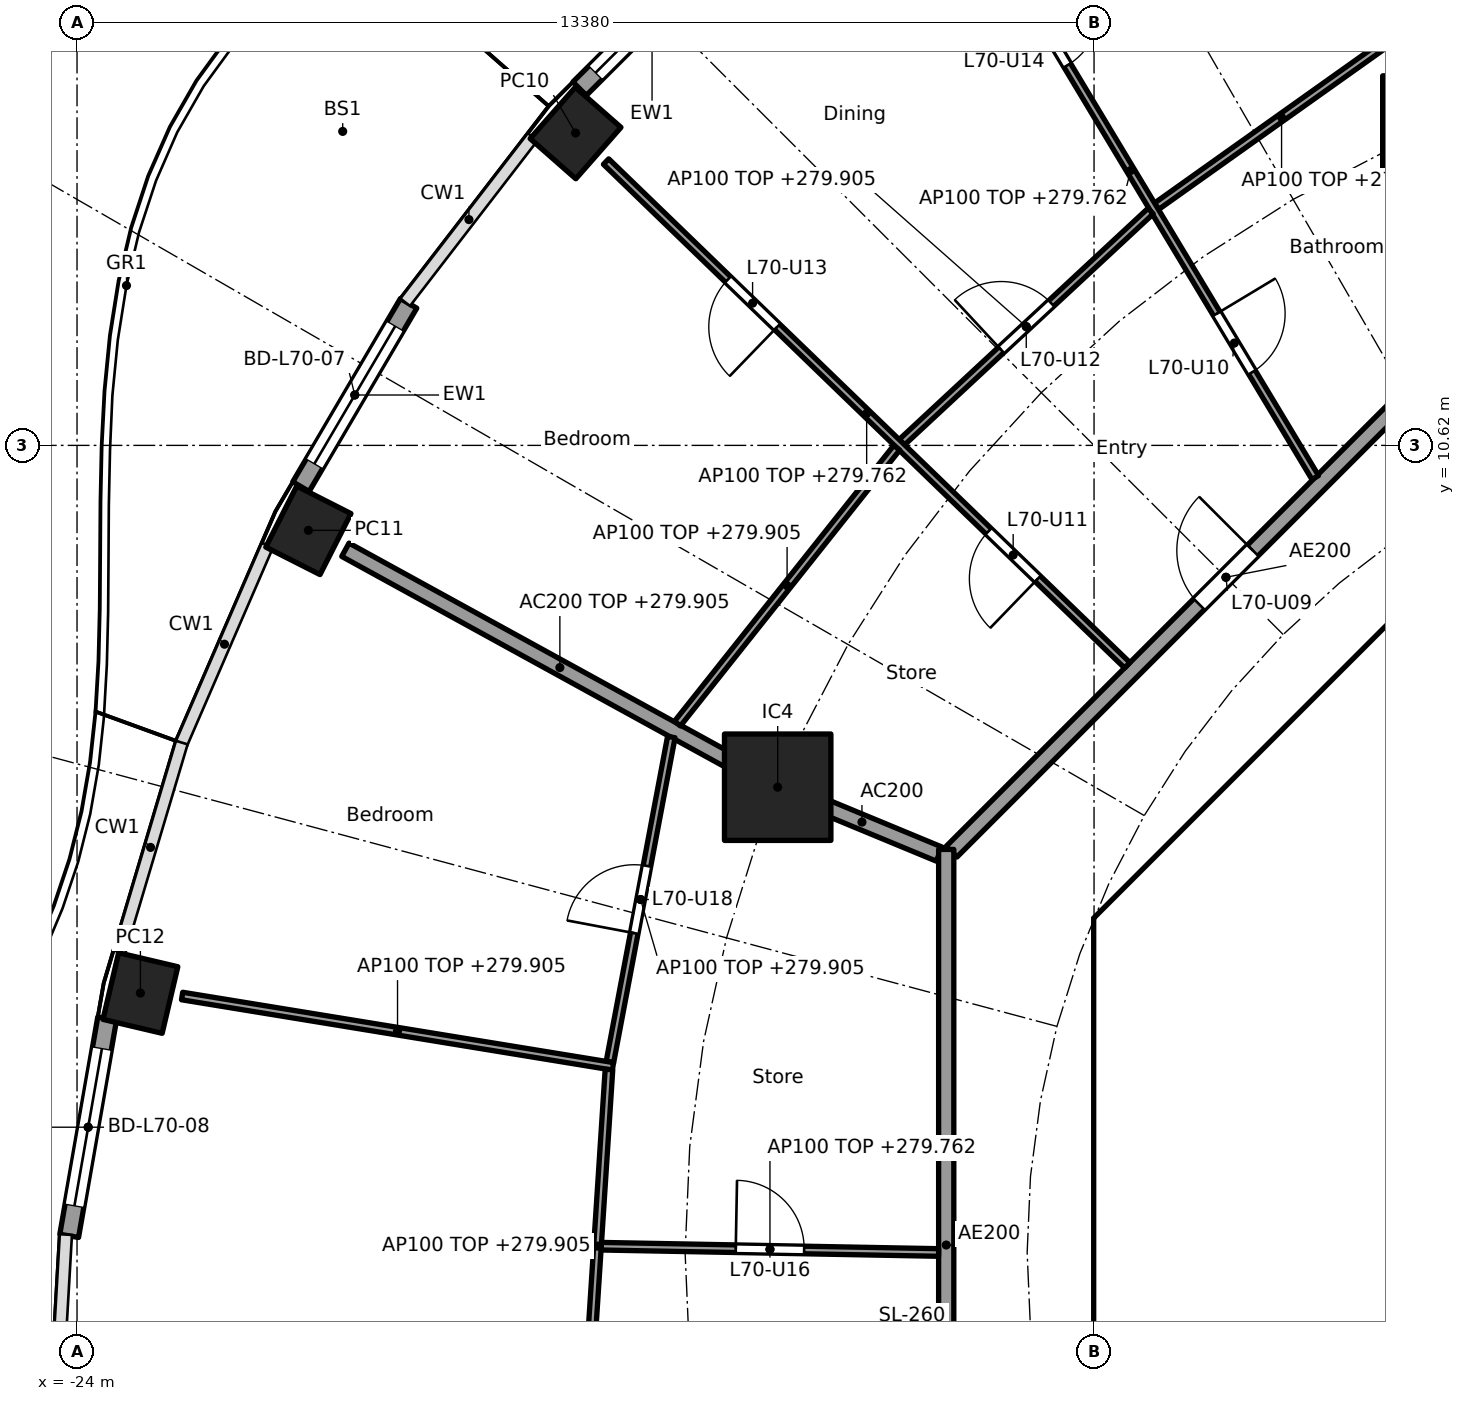
"""IFC4 building model, lengths in metres.
Left out: names, types, materials, properties, quantities, classifications, styles, units other than length and angle.
Written with IfcOpenShell. Run it as: python <this file> out.ifc"""

import sys

from ifc_helpers import new_model, si_unit, direction, frame, frame_2d, origin, origin_2d, place, context, subcontext, project, spatial, polyline, rectangle, hollow_rectangle, outline, extrude, element, fill, save


model = new_model("IFC4")
c1 = context("Model", 3, precision=1e-05, world=origin(), true_north=direction((0.0, 1.0)))
c2 = subcontext(c1, "Body", "Model", "MODEL_VIEW")
j1 = project(units=[si_unit("LENGTHUNIT", "METRE"), si_unit("PLANEANGLEUNIT", "RADIAN")], contexts=[c1])
p1 = place(None, origin())
s1 = spatial("IfcSite", under=j1, at=p1, CompositionType="ELEMENT")
p2 = place(p1, origin())
s2 = spatial("IfcBuilding", under=s1, at=p2, CompositionType="ELEMENT")
p3 = place(p2, frame((0.0, 0.0, 277.0)))
s3 = spatial("IfcBuildingStorey", under=s2, at=p3, CompositionType="ELEMENT", Elevation=277.0)
for number, where, z_axis, x_axis in (
    (1, (-17.441, 14.73, 0.0), (0.0, 0.0, 1.0), (-0.66, -0.751, 0.0)),
    (2, (-20.957, 9.502, 0.0), (0.0, 0.0, 1.0), (-0.452, -0.892, 0.0)),
    (3, (-23.166, 3.415, 0.0), (0.0, 0.0, 1.0), (-0.229, -0.973, 0.0)),
):
    element("IfcColumn", number, at=place(p3, frame(where, z_axis=z_axis, x_axis=x_axis)), inside=s3, PredefinedType="COLUMN", context=c2, shape_type="SweptSolid", body=[
        extrude(hollow_rectangle(XDim=0.9, YDim=0.8, WallThickness=0.028, at=origin_2d()), origin(), (0.0, 0.0, 1.0), 3.7),
    ])
for number, where, z_axis, x_axis in (
    (4, (-6.123, 14.782, 0.0), (0.0, 0.0, 1.0), (1.0, 0.0, 0.0)),
    (5, (-14.782, 6.123, 0.0), (0.0, 0.0, 1.0), (1.0, 0.0, 0.0)),
):
    element("IfcColumn", number, at=place(p3, frame(where, z_axis=z_axis, x_axis=x_axis)), inside=s3, PredefinedType="COLUMN", context=c2, shape_type="SweptSolid", body=[
        extrude(rectangle(XDim=1.4, YDim=1.4, at=origin_2d()), origin(), (0.0, 0.0, 1.0), 3.7),
    ])
p4 = place(p3, frame((-17.388, 15.313, 0.0), z_axis=(0.0, 0.0, 1.0), x_axis=(0.707831739508, 0.706381078841, 0.0)))
e6 = element("IfcWall", 6, at=p4, inside=s3, PredefinedType="SOLIDWALL", context=c2, shape_type="SweptSolid", body=[
    extrude(rectangle(XDim=2.693, YDim=0.25, at=frame_2d((1.346, 0.0))), origin(), (0.0, 0.0, 1.0), 3.44),
])
p5 = place(p4, frame((0.296, 0.0, 0.0)))
e7 = element("IfcOpeningElement", 7, at=p5, cuts=e6, PredefinedType="OPENING", context=c2, shape_type="SweptSolid", body=[
    extrude(rectangle(XDim=2.1, YDim=2.4, at=frame_2d((1.05, 1.2))), frame((0.0, 0.135, 0.0), z_axis=(0.0, -1.0, 0.0), x_axis=(1.0, 0.0, 0.0)), (0.0, 0.0, 1.0), 0.27),
])
p6 = place(p3, frame((-21.054, 10.077, 0.0), z_axis=(0.0, 0.0, 1.0), x_axis=(0.506371364425, 0.862315511452, 0.0)))
e8 = element("IfcWall", 8, at=p6, inside=s3, PredefinedType="SOLIDWALL", context=c2, shape_type="SweptSolid", body=[
    extrude(rectangle(XDim=2.796, YDim=0.25, at=frame_2d((1.398, 0.0))), origin(), (0.0, 0.0, 1.0), 3.44),
])
p7 = place(p6, frame((0.348, 0.0, 0.0)))
e9 = element("IfcOpeningElement", 9, at=p7, cuts=e8, PredefinedType="OPENING", context=c2, shape_type="SweptSolid", body=[
    extrude(rectangle(XDim=2.1, YDim=2.4, at=frame_2d((1.05, 1.2))), frame((0.0, 0.135, 0.0), z_axis=(0.0, -1.0, 0.0), x_axis=(1.0, 0.0, 0.0)), (0.0, 0.0, 1.0), 0.27),
])
p8 = place(p3, frame((-24.103, 0.22, 0.0), z_axis=(0.0, 0.0, 1.0), x_axis=(0.172182411767, 0.985065082661, 0.0)))
e10 = element("IfcWall", 10, at=p8, inside=s3, PredefinedType="SOLIDWALL", context=c2, shape_type="SweptSolid", body=[
    extrude(rectangle(XDim=2.903, YDim=0.25, at=frame_2d((1.451, 0.0))), origin(), (0.0, 0.0, 1.0), 3.44),
])
p9 = place(p8, frame((0.401, 0.0, 0.0)))
e11 = element("IfcOpeningElement", 11, at=p9, cuts=e10, PredefinedType="OPENING", context=c2, shape_type="SweptSolid", body=[
    extrude(rectangle(XDim=2.1, YDim=2.4, at=frame_2d((1.05, 1.2))), frame((0.0, 0.135, 0.0), z_axis=(0.0, -1.0, 0.0), x_axis=(1.0, 0.0, 0.0)), (0.0, 0.0, 1.0), 0.27),
])
p10 = place(p3, frame((-4.613, 9.988, 0.0), z_axis=(0.0, 0.0, 1.0), x_axis=(-0.707106781187, -0.707106781187, 0.0)))
e12 = element("IfcWall", 12, at=p10, inside=s3, PredefinedType="SHEAR", context=c2, shape_type="SweptSolid", body=[
    extrude(rectangle(XDim=7.602, YDim=0.6, at=frame_2d((3.801, 0.0))), origin(), (0.0, 0.0, 1.0), 3.44),
])
p11 = place(p10, frame((0.351, 0.0, 0.0)))
e13 = element("IfcOpeningElement", 13, at=p11, cuts=e12, PredefinedType="OPENING", context=c2, shape_type="SweptSolid", body=[
    extrude(rectangle(XDim=1.1, YDim=2.1, at=frame_2d((0.55, 1.05))), frame((0.0, 0.31, 0.0), z_axis=(0.0, -1.0, 0.0), x_axis=(1.0, 0.0, 0.0)), (0.0, 0.0, 1.0), 0.62),
])
p12 = place(p3, frame((-10.325, 3.801, 0.0), z_axis=(0.0, 0.0, 1.0), x_axis=(0.0, -1.0, 0.0)))
e14 = element("IfcWall", 14, at=p12, inside=s3, PredefinedType="SHEAR", context=c2, shape_type="SweptSolid", body=[
    extrude(rectangle(XDim=7.602, YDim=0.6, at=frame_2d((3.801, 0.0))), origin(), (0.0, 0.0, 1.0), 3.44),
])
p13 = place(p12, frame((0.651, 0.0, 0.0)))
e15 = element("IfcOpeningElement", 15, at=p13, cuts=e14, PredefinedType="OPENING", context=c2, shape_type="SweptSolid", body=[
    extrude(rectangle(XDim=1.5, YDim=2.1, at=frame_2d((0.75, 1.05))), frame((0.0, 0.31, 0.0), z_axis=(0.0, -1.0, 0.0), x_axis=(1.0, 0.0, 0.0)), (0.0, 0.0, 1.0), 0.62),
])
p14 = place(p12, frame((5.451, 0.0, 0.0)))
e16 = element("IfcOpeningElement", 16, at=p14, cuts=e14, PredefinedType="OPENING", context=c2, shape_type="SweptSolid", body=[
    extrude(rectangle(XDim=1.5, YDim=2.1, at=frame_2d((0.75, 1.05))), frame((0.0, 0.31, 0.0), z_axis=(0.0, -1.0, 0.0), x_axis=(1.0, 0.0, 0.0)), (0.0, 0.0, 1.0), 0.62),
])
p15 = place(p3, origin())
e17 = element("IfcWall", 17, at=p15, inside=s3, PredefinedType="SHEAR", context=c2, shape_type="SweptSolid", body=[
    extrude(outline(polyline([(-10.2, 4.825), (-9.776, 4.401), (-10.025, 4.152), (-10.025, 3.801), (-10.625, 3.801), (-10.625, 4.401), (-10.2, 4.825)])), origin(), (0.0, 0.0, 1.0), 3.44),
])
p16 = place(p3, frame((-10.025, 4.0, 0.0), z_axis=(0.0, 0.0, 1.0), x_axis=(1.0, 0.0, 0.0)))
e18 = element("IfcWall", 18, at=p16, inside=s3, PredefinedType="PARTITIONING", context=c2, shape_type="SweptSolid", body=[
    extrude(rectangle(XDim=3.325, YDim=0.2, at=frame_2d((1.662, 0.0))), origin(), (0.0, 0.0, 1.0), 3.44),
])
p17 = place(p3, frame((-8.301, 5.8, 0.0), z_axis=(0.0, 0.0, 1.0), x_axis=(1.0, 0.0, 0.0)))
e19 = element("IfcWall", 19, at=p17, inside=s3, PredefinedType="PARTITIONING", context=c2, shape_type="SweptSolid", body=[
    extrude(rectangle(XDim=2.426, YDim=0.15, at=frame_2d((1.213, 0.0))), origin(), (0.0, 0.0, 1.0), 3.44),
])
p18 = place(p3, frame((-6.134, 14.831, 0.0), z_axis=(0.0, 0.0, 1.0), x_axis=(-0.214842475666, 0.976648714047, 0.0)))
e20 = element("IfcWall", 20, at=p18, inside=s3, PredefinedType="PARTITIONING", context=c2, shape_type="SweptSolid", body=[
    extrude(rectangle(XDim=6.031, YDim=0.2, at=frame_2d((3.015, 0.0))), origin(), (0.0, 0.0, 1.0), 2.905),
])
p19 = place(p3, frame((-12.657, 5.243, 0.0), z_axis=(0.0, 0.0, 1.0), x_axis=(-0.923869415315, 0.382707856524, 0.0)))
e21 = element("IfcWall", 21, at=p19, inside=s3, PredefinedType="PARTITIONING", context=c2, shape_type="SweptSolid", body=[
    extrude(rectangle(XDim=2.2, YDim=0.2, at=frame_2d((1.1, 0.0))), origin(), (0.0, 0.0, 1.0), 3.44),
])
p20 = place(p3, frame((-14.826, 6.147, 0.0), z_axis=(0.0, 0.0, 1.0), x_axis=(-0.876484755865, 0.481429613481, 0.0)))
e22 = element("IfcWall", 22, at=p20, inside=s3, PredefinedType="PARTITIONING", context=c2, shape_type="SweptSolid", body=[
    extrude(rectangle(XDim=6.439, YDim=0.2, at=frame_2d((3.219, 0.0))), origin(), (0.0, 0.0, 1.0), 2.905),
])
p21 = place(p3, frame((-5.275, 12.494, 0.0), z_axis=(0.0, 0.0, 1.0), x_axis=(-0.707106781187, -0.707106781187, 0.0)))
e23 = element("IfcWall", 23, at=p21, inside=s3, PredefinedType="PARTITIONING", context=c2, shape_type="SweptSolid", body=[
    extrude(rectangle(XDim=10.209, YDim=0.2, at=frame_2d((5.104, 0.0))), origin(), (0.0, 0.0, 1.0), 3.44),
])
p22 = place(p21, frame((4.604, 0.0, 0.0)))
e24 = element("IfcOpeningElement", 24, at=p22, cuts=e23, PredefinedType="OPENING", context=c2, shape_type="SweptSolid", body=[
    extrude(rectangle(XDim=1.0, YDim=2.1, at=frame_2d((0.5, 1.05))), frame((0.0, 0.11, 0.0), z_axis=(0.0, -1.0, 0.0), x_axis=(1.0, 0.0, 0.0)), (0.0, 0.0, 1.0), 0.22),
])
p23 = place(p3, frame((-12.565, 5.304, 0.0), z_axis=(0.0, 0.0, 1.0), x_axis=(0.0, -1.0, 0.0)))
e25 = element("IfcWall", 25, at=p23, inside=s3, PredefinedType="PARTITIONING", context=c2, shape_type="SweptSolid", body=[
    extrude(rectangle(XDim=10.409, YDim=0.2, at=frame_2d((5.205, 0.0))), origin(), (0.0, 0.0, 1.0), 3.44),
])
p24 = place(p23, frame((6.539, 0.0, 0.0)))
e26 = element("IfcOpeningElement", 26, at=p24, cuts=e25, PredefinedType="OPENING", context=c2, shape_type="SweptSolid", body=[
    extrude(rectangle(XDim=1.0, YDim=2.1, at=frame_2d((0.5, 1.05))), frame((0.0, 0.11, 0.0), z_axis=(0.0, -1.0, 0.0), x_axis=(1.0, 0.0, 0.0)), (0.0, 0.0, 1.0), 0.22),
])
p25 = place(p3, frame((-6.508, 16.103, 0.0), z_axis=(0.0, 0.0, 1.0), x_axis=(-0.815202203556, -0.579176456114, 0.0)))
e27 = element("IfcWall", 27, at=p25, inside=s3, PredefinedType="PARTITIONING", context=c2, shape_type="SweptSolid", body=[
    extrude(rectangle(XDim=4.036, YDim=0.1, at=frame_2d((2.018, 0.0))), origin(), (0.0, 0.0, 1.0), 2.905),
])
p26 = place(p3, frame((-7.709, 10.197, 0.0), z_axis=(0.0, 0.0, 1.0), x_axis=(-0.515516160663, 0.856879856278, 0.0)))
e28 = element("IfcWall", 28, at=p26, inside=s3, PredefinedType="PARTITIONING", context=c2, shape_type="SweptSolid", body=[
    extrude(rectangle(XDim=9.426, YDim=0.1, at=frame_2d((4.713, 0.0))), origin(), (0.0, 0.0, 1.0), 2.762),
])
p27 = place(p26, frame((1.615, 0.0, 0.0)))
e29 = element("IfcOpeningElement", 29, at=p27, cuts=e28, PredefinedType="OPENING", context=c2, shape_type="SweptSolid", body=[
    extrude(rectangle(XDim=0.9, YDim=2.1, at=frame_2d((0.45, 1.05))), frame((0.0, 0.06, 0.0), z_axis=(0.0, -1.0, 0.0), x_axis=(1.0, 0.0, 0.0)), (0.0, 0.0, 1.0), 0.12),
])
p28 = place(p26, frame((6.328, 0.0, 0.0)))
e30 = element("IfcOpeningElement", 30, at=p28, cuts=e28, PredefinedType="OPENING", context=c2, shape_type="SweptSolid", body=[
    extrude(rectangle(XDim=0.9, YDim=2.1, at=frame_2d((0.45, 1.05))), frame((0.0, 0.06, 0.0), z_axis=(0.0, -1.0, 0.0), x_axis=(1.0, 0.0, 0.0)), (0.0, 0.0, 1.0), 0.12),
])
p29 = place(p3, frame((-9.875, 13.702, 0.0), z_axis=(0.0, 0.0, 1.0), x_axis=(-0.732618266441, -0.680639754699, 0.0)))
e31 = element("IfcWall", 31, at=p29, inside=s3, PredefinedType="PARTITIONING", context=c2, shape_type="SweptSolid", body=[
    extrude(rectangle(XDim=4.467, YDim=0.1, at=frame_2d((2.233, 0.0))), origin(), (0.0, 0.0, 1.0), 2.905),
])
p30 = place(p29, frame((1.783, 0.0, 0.0)))
e32 = element("IfcOpeningElement", 32, at=p30, cuts=e31, PredefinedType="OPENING", context=c2, shape_type="SweptSolid", body=[
    extrude(rectangle(XDim=0.9, YDim=2.1, at=frame_2d((0.45, 1.05))), frame((0.0, 0.06, 0.0), z_axis=(0.0, -1.0, 0.0), x_axis=(1.0, 0.0, 0.0)), (0.0, 0.0, 1.0), 0.12),
])
p31 = place(p3, frame((-10.183, 7.727, 0.0), z_axis=(0.0, 0.0, 1.0), x_axis=(-0.719063433856, 0.694944442449, 0.0)))
e33 = element("IfcWall", 33, at=p31, inside=s3, PredefinedType="PARTITIONING", context=c2, shape_type="SweptSolid", body=[
    extrude(rectangle(XDim=9.535, YDim=0.1, at=frame_2d((4.768, 0.0))), origin(), (0.0, 0.0, 1.0), 2.762),
])
p32 = place(p31, frame((1.637, 0.0, 0.0)))
e34 = element("IfcOpeningElement", 34, at=p32, cuts=e33, PredefinedType="OPENING", context=c2, shape_type="SweptSolid", body=[
    extrude(rectangle(XDim=0.9, YDim=2.1, at=frame_2d((0.45, 1.05))), frame((0.0, 0.06, 0.0), z_axis=(0.0, -1.0, 0.0), x_axis=(1.0, 0.0, 0.0)), (0.0, 0.0, 1.0), 0.12),
])
p33 = place(p31, frame((6.405, 0.0, 0.0)))
e35 = element("IfcOpeningElement", 35, at=p33, cuts=e33, PredefinedType="OPENING", context=c2, shape_type="SweptSolid", body=[
    extrude(rectangle(XDim=0.9, YDim=2.1, at=frame_2d((0.45, 1.05))), frame((0.0, 0.06, 0.0), z_axis=(0.0, -1.0, 0.0), x_axis=(1.0, 0.0, 0.0)), (0.0, 0.0, 1.0), 0.12),
])
p34 = place(p3, frame((-13.216, 10.589, 0.0), z_axis=(0.0, 0.0, 1.0), x_axis=(-0.622251572882, -0.782817335045, 0.0)))
e36 = element("IfcWall", 36, at=p34, inside=s3, PredefinedType="PARTITIONING", context=c2, shape_type="SweptSolid", body=[
    extrude(rectangle(XDim=4.636, YDim=0.1, at=frame_2d((2.318, 0.0))), origin(), (0.0, 0.0, 1.0), 2.905),
])
p35 = place(p3, frame((-16.181, 6.783, 0.0), z_axis=(0.0, 0.0, 1.0), x_axis=(-0.185670583745, -0.982612046706, 0.0)))
e37 = element("IfcWall", 37, at=p35, inside=s3, PredefinedType="PARTITIONING", context=c2, shape_type="SweptSolid", body=[
    extrude(rectangle(XDim=4.351, YDim=0.1, at=frame_2d((2.176, 0.0))), origin(), (0.0, 0.0, 1.0), 2.905),
])
p36 = place(p35, frame((1.726, 0.0, 0.0)))
e38 = element("IfcOpeningElement", 38, at=p36, cuts=e37, PredefinedType="OPENING", context=c2, shape_type="SweptSolid", body=[
    extrude(rectangle(XDim=0.9, YDim=2.1, at=frame_2d((0.45, 1.05))), frame((0.0, 0.06, 0.0), z_axis=(0.0, -1.0, 0.0), x_axis=(1.0, 0.0, 0.0)), (0.0, 0.0, 1.0), 0.12),
])
p37 = place(p3, frame((-16.949, 2.451, 0.0), z_axis=(0.0, 0.0, 1.0), x_axis=(-0.986937570833, 0.161103169673, 0.0)))
e39 = element("IfcWall", 39, at=p37, inside=s3, PredefinedType="PARTITIONING", context=c2, shape_type="SweptSolid", body=[
    extrude(rectangle(XDim=5.743, YDim=0.1, at=frame_2d((2.872, 0.0))), origin(), (0.0, 0.0, 1.0), 2.905),
])
p38 = place(p3, frame((-17.002, 2.409, 0.0), z_axis=(0.0, 0.0, 1.0), x_axis=(-0.064855550758, -0.997894662545, 0.0)))
e40 = element("IfcWall", 40, at=p38, inside=s3, PredefinedType="PARTITIONING", context=c2, shape_type="SweptSolid", body=[
    extrude(rectangle(XDim=4.656, YDim=0.1, at=frame_2d((2.328, 0.0))), origin(), (0.0, 0.0, 1.0), 2.905),
])
p39 = place(p3, frame((-12.665, 0.002, 0.0), z_axis=(0.0, 0.0, 1.0), x_axis=(-0.999827178165, 0.018590691287, 0.0)))
e41 = element("IfcWall", 41, at=p39, inside=s3, PredefinedType="PARTITIONING", context=c2, shape_type="SweptSolid", body=[
    extrude(rectangle(XDim=4.439, YDim=0.1, at=frame_2d((2.219, 0.0))), origin(), (0.0, 0.0, 1.0), 2.762),
])
p40 = place(p39, frame((1.769, 0.0, 0.0)))
e42 = element("IfcOpeningElement", 42, at=p40, cuts=e41, PredefinedType="OPENING", context=c2, shape_type="SweptSolid", body=[
    extrude(rectangle(XDim=0.9, YDim=2.1, at=frame_2d((0.45, 1.05))), frame((0.0, 0.06, 0.0), z_axis=(0.0, -1.0, 0.0), x_axis=(1.0, 0.0, 0.0)), (0.0, 0.0, 1.0), 0.12),
])
p41 = place(p5, origin())
e43 = element("IfcDoor", 43, at=p41, inside=s3, OperationType="SLIDING_TO_LEFT", PredefinedType="DOOR", context=c2, shape_type="SweptSolid", body=[
    extrude(rectangle(XDim=2.1, YDim=2.4, at=frame_2d((1.05, 1.2))), frame((0.0, 0.025, 0.0), z_axis=(0.0, -1.0, 0.0), x_axis=(1.0, 0.0, 0.0)), (0.0, 0.0, 1.0), 0.05),
])
fill(e7, e43)
p42 = place(p7, origin())
e44 = element("IfcDoor", 44, at=p42, inside=s3, OperationType="SLIDING_TO_LEFT", PredefinedType="DOOR", context=c2, shape_type="SweptSolid", body=[
    extrude(rectangle(XDim=2.1, YDim=2.4, at=frame_2d((1.05, 1.2))), frame((0.0, 0.025, 0.0), z_axis=(0.0, -1.0, 0.0), x_axis=(1.0, 0.0, 0.0)), (0.0, 0.0, 1.0), 0.05),
])
fill(e9, e44)
p43 = place(p9, origin())
e45 = element("IfcDoor", 45, at=p43, inside=s3, OperationType="SLIDING_TO_LEFT", PredefinedType="DOOR", context=c2, shape_type="SweptSolid", body=[
    extrude(rectangle(XDim=2.1, YDim=2.4, at=frame_2d((1.05, 1.2))), frame((0.0, 0.025, 0.0), z_axis=(0.0, -1.0, 0.0), x_axis=(1.0, 0.0, 0.0)), (0.0, 0.0, 1.0), 0.05),
])
fill(e11, e45)
p44 = place(p13, origin())
e46 = element("IfcDoor", 46, at=p44, inside=s3, OperationType="DOUBLE_DOOR_SINGLE_SWING", PredefinedType="DOOR", context=c2, shape_type="SweptSolid", body=[
    extrude(rectangle(XDim=1.5, YDim=2.1, at=frame_2d((0.75, 1.05))), frame((0.0, 0.025, 0.0), z_axis=(0.0, -1.0, 0.0), x_axis=(1.0, 0.0, 0.0)), (0.0, 0.0, 1.0), 0.05),
])
fill(e15, e46)
p45 = place(p22, frame((1.0, 0.0, 0.0), x_axis=(-1.0, 0.0, 0.0)))
e47 = element("IfcDoor", 47, at=p45, inside=s3, OperationType="SINGLE_SWING_RIGHT", PredefinedType="DOOR", context=c2, shape_type="SweptSolid", body=[
    extrude(rectangle(XDim=1.0, YDim=2.1, at=frame_2d((0.5, 1.05))), frame((0.0, 0.025, 0.0), z_axis=(0.0, -1.0, 0.0), x_axis=(1.0, 0.0, 0.0)), (0.0, 0.0, 1.0), 0.05),
])
fill(e24, e47)
p46 = place(p27, frame((0.9, 0.0, 0.0), x_axis=(-1.0, 0.0, 0.0)))
e48 = element("IfcDoor", 48, at=p46, inside=s3, OperationType="SINGLE_SWING_LEFT", PredefinedType="DOOR", context=c2, shape_type="SweptSolid", body=[
    extrude(rectangle(XDim=0.9, YDim=2.1, at=frame_2d((0.45, 1.05))), frame((0.0, 0.025, 0.0), z_axis=(0.0, -1.0, 0.0), x_axis=(1.0, 0.0, 0.0)), (0.0, 0.0, 1.0), 0.05),
])
fill(e29, e48)
p47 = place(p32, origin())
e49 = element("IfcDoor", 49, at=p47, inside=s3, OperationType="SINGLE_SWING_LEFT", PredefinedType="DOOR", context=c2, shape_type="SweptSolid", body=[
    extrude(rectangle(XDim=0.9, YDim=2.1, at=frame_2d((0.45, 1.05))), frame((0.0, 0.025, 0.0), z_axis=(0.0, -1.0, 0.0), x_axis=(1.0, 0.0, 0.0)), (0.0, 0.0, 1.0), 0.05),
])
fill(e34, e49)
p48 = place(p30, frame((0.9, 0.0, 0.0), x_axis=(-1.0, 0.0, 0.0)))
e50 = element("IfcDoor", 50, at=p48, inside=s3, OperationType="SINGLE_SWING_LEFT", PredefinedType="DOOR", context=c2, shape_type="SweptSolid", body=[
    extrude(rectangle(XDim=0.9, YDim=2.1, at=frame_2d((0.45, 1.05))), frame((0.0, 0.025, 0.0), z_axis=(0.0, -1.0, 0.0), x_axis=(1.0, 0.0, 0.0)), (0.0, 0.0, 1.0), 0.05),
])
fill(e32, e50)
p49 = place(p33, origin())
e51 = element("IfcDoor", 51, at=p49, inside=s3, OperationType="SINGLE_SWING_LEFT", PredefinedType="DOOR", context=c2, shape_type="SweptSolid", body=[
    extrude(rectangle(XDim=0.9, YDim=2.1, at=frame_2d((0.45, 1.05))), frame((0.0, 0.025, 0.0), z_axis=(0.0, -1.0, 0.0), x_axis=(1.0, 0.0, 0.0)), (0.0, 0.0, 1.0), 0.05),
])
fill(e35, e51)
p50 = place(p28, frame((0.9, 0.0, 0.0), x_axis=(-1.0, 0.0, 0.0)))
e52 = element("IfcDoor", 52, at=p50, inside=s3, OperationType="SINGLE_SWING_LEFT", PredefinedType="DOOR", context=c2, shape_type="SweptSolid", body=[
    extrude(rectangle(XDim=0.9, YDim=2.1, at=frame_2d((0.45, 1.05))), frame((0.0, 0.025, 0.0), z_axis=(0.0, -1.0, 0.0), x_axis=(1.0, 0.0, 0.0)), (0.0, 0.0, 1.0), 0.05),
])
fill(e30, e52)
p51 = place(p40, frame((0.9, 0.0, 0.0), x_axis=(-1.0, 0.0, 0.0)))
e53 = element("IfcDoor", 53, at=p51, inside=s3, OperationType="SINGLE_SWING_LEFT", PredefinedType="DOOR", context=c2, shape_type="SweptSolid", body=[
    extrude(rectangle(XDim=0.9, YDim=2.1, at=frame_2d((0.45, 1.05))), frame((0.0, 0.025, 0.0), z_axis=(0.0, -1.0, 0.0), x_axis=(1.0, 0.0, 0.0)), (0.0, 0.0, 1.0), 0.05),
])
fill(e42, e53)
p52 = place(p36, frame((0.9, 0.0, 0.0), x_axis=(-1.0, 0.0, 0.0)))
e54 = element("IfcDoor", 54, at=p52, inside=s3, OperationType="SINGLE_SWING_LEFT", PredefinedType="DOOR", context=c2, shape_type="SweptSolid", body=[
    extrude(rectangle(XDim=0.9, YDim=2.1, at=frame_2d((0.45, 1.05))), frame((0.0, 0.025, 0.0), z_axis=(0.0, -1.0, 0.0), x_axis=(1.0, 0.0, 0.0)), (0.0, 0.0, 1.0), 0.05),
])
fill(e38, e54)
save(model, sys.argv[1])
